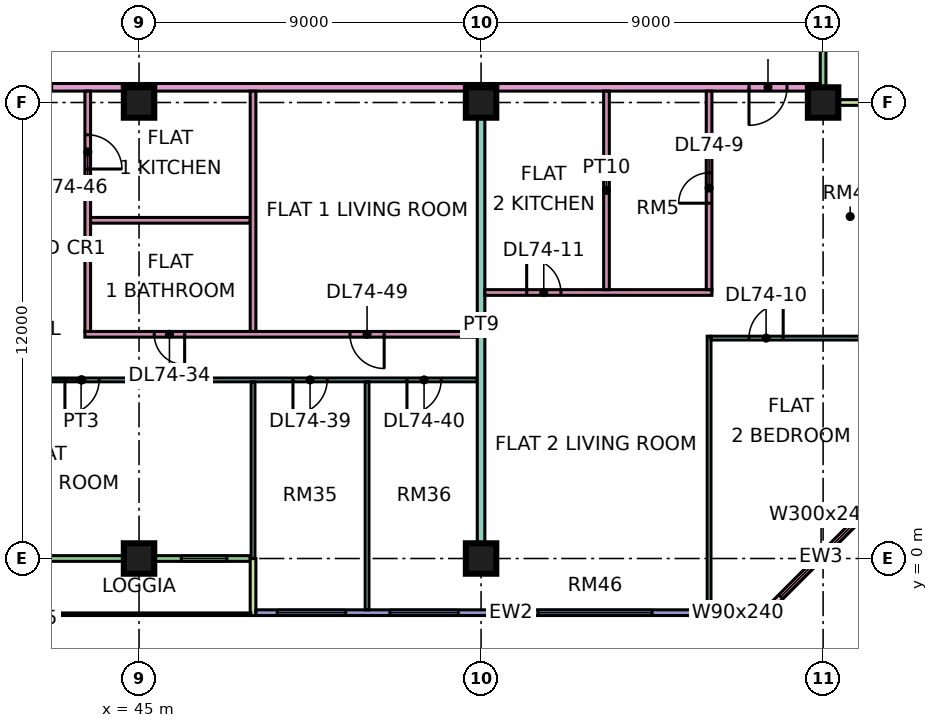
"""IFC4 building model, lengths in metres.
Left out: names, types, materials, properties, quantities, classifications, styles, units other than length and angle.
Written with IfcOpenShell. Run it as: python <this file> out.ifc"""

import sys

from ifc_helpers import new_model, si_unit, direction, frame, frame_2d, origin, origin_2d, place, context, subcontext, project, spatial, rectangle, extrude, element, fill, save


model = new_model("IFC4")
c1 = context("Model", 3, precision=1e-05, world=origin(), true_north=direction((0.0, 1.0)))
c2 = subcontext(c1, "Body", "Model", "MODEL_VIEW")
j1 = project(units=[si_unit("LENGTHUNIT", "METRE"), si_unit("PLANEANGLEUNIT", "RADIAN")], contexts=[c1])
p1 = place(None, origin())
s1 = spatial("IfcSite", under=j1, at=p1, CompositionType="ELEMENT")
p2 = place(p1, origin())
s2 = spatial("IfcBuilding", under=s1, at=p2, CompositionType="ELEMENT")
p3 = place(p2, frame((0.0, 0.0, 314.65)))
s3 = spatial("IfcBuildingStorey", under=s2, at=p3, CompositionType="ELEMENT", Elevation=314.65)
for number, where, z_axis, x_axis in (
    (1, (45.0, 0.0, 0.0), (0.0, 0.0, 1.0), (1.0, 0.0, 0.0)),
    (2, (45.0, 12.0, 0.0), (0.0, 0.0, 1.0), (1.0, 0.0, 0.0)),
    (3, (54.0, 0.0, 0.0), (0.0, 0.0, 1.0), (1.0, 0.0, 0.0)),
    (4, (54.0, 12.0, 0.0), (0.0, 0.0, 1.0), (1.0, 0.0, 0.0)),
    (5, (63.0, 12.0, 0.0), (0.0, 0.0, 1.0), (1.0, 0.0, 0.0)),
):
    element("IfcColumn", number, at=place(p3, frame(where, z_axis=z_axis, x_axis=x_axis)), inside=s3, PredefinedType="COLUMN", context=c2, shape_type="SweptSolid", body=[
        extrude(rectangle(XDim=0.8, YDim=0.8, at=origin_2d()), origin(), (0.0, 0.0, 1.0), 3.75),
    ])
p4 = place(p3, frame((36.075, 0.0, 0.0), z_axis=(0.0, 0.0, 1.0), x_axis=(1.0, 0.0, 0.0)))
e6 = element("IfcWall", 6, at=p4, inside=s3, PredefinedType="SOLIDWALL", context=c2, shape_type="SweptSolid", body=[
    extrude(rectangle(XDim=11.85, YDim=0.15, at=frame_2d((5.925, 0.0))), origin(), (0.0, 0.0, 1.0), 3.35),
])
p5 = place(p4, frame((0.775, 0.0, 0.45)))
e7 = element("IfcOpeningElement", 7, at=p5, cuts=e6, PredefinedType="OPENING", context=c2, shape_type="SweptSolid", body=[
    extrude(rectangle(XDim=1.8, YDim=2.4, at=frame_2d((0.9, 1.2))), frame((0.0, 0.085, 0.0), z_axis=(0.0, -1.0, 0.0), x_axis=(1.0, 0.0, 0.0)), (0.0, 0.0, 1.0), 0.17),
])
p6 = place(p4, frame((4.775, 0.0, 0.0)))
e8 = element("IfcOpeningElement", 8, at=p6, cuts=e6, PredefinedType="OPENING", context=c2, shape_type="SweptSolid", body=[
    extrude(rectangle(XDim=1.8, YDim=2.4, at=frame_2d((0.9, 1.2))), frame((0.0, 0.085, 0.0), z_axis=(0.0, -1.0, 0.0), x_axis=(1.0, 0.0, 0.0)), (0.0, 0.0, 1.0), 0.17),
])
p7 = place(p4, frame((10.038, 0.0, 0.45)))
e9 = element("IfcOpeningElement", 9, at=p7, cuts=e6, PredefinedType="OPENING", context=c2, shape_type="SweptSolid", body=[
    extrude(rectangle(XDim=1.2, YDim=2.4, at=frame_2d((0.6, 1.2))), frame((0.0, 0.085, 0.0), z_axis=(0.0, -1.0, 0.0), x_axis=(1.0, 0.0, 0.0)), (0.0, 0.0, 1.0), 0.17),
])
p8 = place(p3, frame((48.0, -1.5, 0.0), z_axis=(0.0, 0.0, 1.0), x_axis=(0.0, 1.0, 0.0)))
e10 = element("IfcWall", 10, at=p8, inside=s3, PredefinedType="SOLIDWALL", context=c2, shape_type="SweptSolid", body=[
    extrude(rectangle(XDim=1.5, YDim=0.15, at=frame_2d((0.75, 0.0))), origin(), (0.0, 0.0, 1.0), 3.35),
])
p9 = place(p3, frame((48.075, -1.425, 0.0), z_axis=(0.0, 0.0, 1.0), x_axis=(1.0, 0.0, 0.0)))
e11 = element("IfcWall", 11, at=p9, inside=s3, PredefinedType="SOLIDWALL", context=c2, shape_type="SweptSolid", body=[
    extrude(rectangle(XDim=13.425, YDim=0.15, at=frame_2d((6.712, 0.0))), origin(), (0.0, 0.0, 1.0), 3.35),
])
p10 = place(p9, frame((0.562, 0.0, 0.45)))
e12 = element("IfcOpeningElement", 12, at=p10, cuts=e11, PredefinedType="OPENING", context=c2, shape_type="SweptSolid", body=[
    extrude(rectangle(XDim=1.8, YDim=2.4, at=frame_2d((0.9, 1.2))), frame((0.0, 0.085, 0.0), z_axis=(0.0, -1.0, 0.0), x_axis=(1.0, 0.0, 0.0)), (0.0, 0.0, 1.0), 0.17),
])
p11 = place(p9, frame((3.525, 0.0, 0.45)))
e13 = element("IfcOpeningElement", 13, at=p11, cuts=e11, PredefinedType="OPENING", context=c2, shape_type="SweptSolid", body=[
    extrude(rectangle(XDim=1.8, YDim=2.4, at=frame_2d((0.9, 1.2))), frame((0.0, 0.085, 0.0), z_axis=(0.0, -1.0, 0.0), x_axis=(1.0, 0.0, 0.0)), (0.0, 0.0, 1.0), 0.17),
])
p12 = place(p9, frame((7.425, 0.0, 0.45)))
e14 = element("IfcOpeningElement", 14, at=p12, cuts=e11, PredefinedType="OPENING", context=c2, shape_type="SweptSolid", body=[
    extrude(rectangle(XDim=3.0, YDim=2.4, at=frame_2d((1.5, 1.2))), frame((0.0, 0.085, 0.0), z_axis=(0.0, -1.0, 0.0), x_axis=(1.0, 0.0, 0.0)), (0.0, 0.0, 1.0), 0.17),
])
p13 = place(p9, frame((12.225, 0.0, 0.45)))
e15 = element("IfcOpeningElement", 15, at=p13, cuts=e11, PredefinedType="OPENING", context=c2, shape_type="SweptSolid", body=[
    extrude(rectangle(XDim=0.9, YDim=2.4, at=frame_2d((0.45, 1.2))), frame((0.0, 0.085, 0.0), z_axis=(0.0, -1.0, 0.0), x_axis=(1.0, 0.0, 0.0)), (0.0, 0.0, 1.0), 0.17),
])
p14 = place(p3, frame((61.447, -1.447, 0.0), z_axis=(0.0, 0.0, 1.0), x_axis=(0.707106781187, 0.707106781187, 0.0)))
e16 = element("IfcWall", 16, at=p14, inside=s3, PredefinedType="SOLIDWALL", context=c2, shape_type="SweptSolid", body=[
    extrude(rectangle(XDim=4.243, YDim=0.15, at=frame_2d((2.121, 0.0))), origin(), (0.0, 0.0, 1.0), 3.35),
])
p15 = place(p14, frame((0.621, 0.0, 0.45)))
e17 = element("IfcOpeningElement", 17, at=p15, cuts=e16, PredefinedType="OPENING", context=c2, shape_type="SweptSolid", body=[
    extrude(rectangle(XDim=3.0, YDim=2.4, at=frame_2d((1.5, 1.2))), frame((0.0, 0.085, 0.0), z_axis=(0.0, -1.0, 0.0), x_axis=(1.0, 0.0, 0.0)), (0.0, 0.0, 1.0), 0.17),
])
p16 = place(p3, frame((63.0, 12.075, 0.0), z_axis=(0.0, 0.0, 1.0), x_axis=(0.0, 1.0, 0.0)))
e18 = element("IfcWall", 18, at=p16, inside=s3, PredefinedType="SOLIDWALL", context=c2, shape_type="SweptSolid", body=[
    extrude(rectangle(XDim=10.35, YDim=0.15, at=frame_2d((5.175, 0.0))), origin(), (0.0, 0.0, 1.0), 3.35),
])
p17 = place(p16, frame((6.038, 0.0, 0.0)))
e19 = element("IfcOpeningElement", 19, at=p17, cuts=e18, PredefinedType="OPENING", context=c2, shape_type="SweptSolid", body=[
    extrude(rectangle(XDim=1.8, YDim=2.4, at=frame_2d((0.9, 1.2))), frame((0.0, 0.085, 0.0), z_axis=(0.0, -1.0, 0.0), x_axis=(1.0, 0.0, 0.0)), (0.0, 0.0, 1.0), 0.17),
])
p18 = place(p3, frame((64.5, 12.0, 0.0), z_axis=(0.0, 0.0, 1.0), x_axis=(-1.0, 0.0, 0.0)))
e20 = element("IfcWall", 20, at=p18, inside=s3, PredefinedType="SOLIDWALL", context=c2, shape_type="SweptSolid", body=[
    extrude(rectangle(XDim=1.5, YDim=0.15, at=frame_2d((0.75, 0.0))), origin(), (0.0, 0.0, 1.0), 3.35),
])
p19 = place(p3, frame((33.05, 4.7, 0.0), z_axis=(0.0, 0.0, 1.0), x_axis=(1.0, 0.0, 0.0)))
e21 = element("IfcWall", 21, at=p19, inside=s3, PredefinedType="PARTITIONING", context=c2, shape_type="SweptSolid", body=[
    extrude(rectangle(XDim=20.85, YDim=0.1, at=frame_2d((10.425, 0.0))), origin(), (0.0, 0.0, 1.0), 3.35),
])
p20 = place(p19, frame((1.0, 0.0, 0.0)))
e22 = element("IfcOpeningElement", 22, at=p20, cuts=e21, PredefinedType="OPENING", context=c2, shape_type="SweptSolid", body=[
    extrude(rectangle(XDim=0.9, YDim=2.1, at=frame_2d((0.45, 1.05))), frame((0.0, 0.06, 0.0), z_axis=(0.0, -1.0, 0.0), x_axis=(1.0, 0.0, 0.0)), (0.0, 0.0, 1.0), 0.12),
])
p21 = place(p19, frame((4.0, 0.0, 0.0)))
e23 = element("IfcOpeningElement", 23, at=p21, cuts=e21, PredefinedType="OPENING", context=c2, shape_type="SweptSolid", body=[
    extrude(rectangle(XDim=0.9, YDim=2.1, at=frame_2d((0.45, 1.05))), frame((0.0, 0.06, 0.0), z_axis=(0.0, -1.0, 0.0), x_axis=(1.0, 0.0, 0.0)), (0.0, 0.0, 1.0), 0.12),
])
p22 = place(p19, frame((16.0, 0.0, 0.0)))
e24 = element("IfcOpeningElement", 24, at=p22, cuts=e21, PredefinedType="OPENING", context=c2, shape_type="SweptSolid", body=[
    extrude(rectangle(XDim=0.9, YDim=2.1, at=frame_2d((0.45, 1.05))), frame((0.0, 0.06, 0.0), z_axis=(0.0, -1.0, 0.0), x_axis=(1.0, 0.0, 0.0)), (0.0, 0.0, 1.0), 0.12),
])
p23 = place(p19, frame((19.0, 0.0, 0.0)))
e25 = element("IfcOpeningElement", 25, at=p23, cuts=e21, PredefinedType="OPENING", context=c2, shape_type="SweptSolid", body=[
    extrude(rectangle(XDim=0.9, YDim=2.1, at=frame_2d((0.45, 1.05))), frame((0.0, 0.06, 0.0), z_axis=(0.0, -1.0, 0.0), x_axis=(1.0, 0.0, 0.0)), (0.0, 0.0, 1.0), 0.12),
])
p24 = place(p19, frame((10.0, 0.0, 0.0)))
e26 = element("IfcOpeningElement", 26, at=p24, cuts=e21, PredefinedType="OPENING", context=c2, shape_type="SweptSolid", body=[
    extrude(rectangle(XDim=0.9, YDim=2.1, at=frame_2d((0.45, 1.05))), frame((0.0, 0.06, 0.0), z_axis=(0.0, -1.0, 0.0), x_axis=(1.0, 0.0, 0.0)), (0.0, 0.0, 1.0), 0.12),
])
p25 = place(p3, frame((40.65, 12.4, 0.0), z_axis=(0.0, 0.0, 1.0), x_axis=(1.0, 0.0, 0.0)))
e27 = element("IfcWall", 27, at=p25, inside=s3, PredefinedType="PARTITIONING", context=c2, shape_type="SweptSolid", body=[
    extrude(rectangle(XDim=22.276, YDim=0.2, at=frame_2d((11.138, 0.0))), origin(), (0.0, 0.0, 1.0), 3.35),
])
p26 = place(p25, frame((20.4, 0.0, 0.0)))
e28 = element("IfcOpeningElement", 28, at=p26, cuts=e27, PredefinedType="OPENING", context=c2, shape_type="SweptSolid", body=[
    extrude(rectangle(XDim=1.0, YDim=2.1, at=frame_2d((0.5, 1.05))), frame((0.0, 0.11, 0.0), z_axis=(0.0, -1.0, 0.0), x_axis=(1.0, 0.0, 0.0)), (0.0, 0.0, 1.0), 0.22),
])
p27 = place(p25, frame((1.05, 0.0, 0.0)))
e29 = element("IfcOpeningElement", 29, at=p27, cuts=e27, PredefinedType="OPENING", context=c2, shape_type="SweptSolid", body=[
    extrude(rectangle(XDim=1.0, YDim=2.1, at=frame_2d((0.5, 1.05))), frame((0.0, 0.11, 0.0), z_axis=(0.0, -1.0, 0.0), x_axis=(1.0, 0.0, 0.0)), (0.0, 0.0, 1.0), 0.22),
])
p28 = place(p3, frame((43.575, 5.9, 0.0), z_axis=(0.0, 0.0, 1.0), x_axis=(1.0, 0.0, 0.0)))
e30 = element("IfcWall", 30, at=p28, inside=s3, PredefinedType="PARTITIONING", context=c2, shape_type="SweptSolid", body=[
    extrude(rectangle(XDim=10.325, YDim=0.15, at=frame_2d((5.163, 0.0))), origin(), (0.0, 0.0, 1.0), 3.35),
])
p29 = place(p28, frame((1.825, 0.0, 0.0)))
e31 = element("IfcOpeningElement", 31, at=p29, cuts=e30, PredefinedType="OPENING", context=c2, shape_type="SweptSolid", body=[
    extrude(rectangle(XDim=0.8, YDim=2.1, at=frame_2d((0.4, 1.05))), frame((0.0, 0.085, 0.0), z_axis=(0.0, -1.0, 0.0), x_axis=(1.0, 0.0, 0.0)), (0.0, 0.0, 1.0), 0.17),
])
p30 = place(p28, frame((6.975, 0.0, 0.0)))
e32 = element("IfcOpeningElement", 32, at=p30, cuts=e30, PredefinedType="OPENING", context=c2, shape_type="SweptSolid", body=[
    extrude(rectangle(XDim=0.9, YDim=2.1, at=frame_2d((0.45, 1.05))), frame((0.0, 0.085, 0.0), z_axis=(0.0, -1.0, 0.0), x_axis=(1.0, 0.0, 0.0)), (0.0, 0.0, 1.0), 0.17),
])
p31 = place(p3, frame((43.65, 5.975, 0.0), z_axis=(0.0, 0.0, 1.0), x_axis=(0.0, 1.0, 0.0)))
e33 = element("IfcWall", 33, at=p31, inside=s3, PredefinedType="PARTITIONING", context=c2, shape_type="SweptSolid", body=[
    extrude(rectangle(XDim=6.325, YDim=0.15, at=frame_2d((3.163, 0.0))), origin(), (0.0, 0.0, 1.0), 3.35),
])
p32 = place(p31, frame((4.275, 0.0, 0.0)))
e34 = element("IfcOpeningElement", 34, at=p32, cuts=e33, PredefinedType="OPENING", context=c2, shape_type="SweptSolid", body=[
    extrude(rectangle(XDim=0.9, YDim=2.1, at=frame_2d((0.45, 1.05))), frame((0.0, 0.085, 0.0), z_axis=(0.0, -1.0, 0.0), x_axis=(1.0, 0.0, 0.0)), (0.0, 0.0, 1.0), 0.17),
])
p33 = place(p3, frame((43.725, 8.9, 0.0), z_axis=(0.0, 0.0, 1.0), x_axis=(1.0, 0.0, 0.0)))
e35 = element("IfcWall", 35, at=p33, inside=s3, PredefinedType="PARTITIONING", context=c2, shape_type="SweptSolid", body=[
    extrude(rectangle(XDim=4.2, YDim=0.15, at=frame_2d((2.1, 0.0))), origin(), (0.0, 0.0, 1.0), 3.35),
])
p34 = place(p3, frame((48.0, 0.0, 0.0), z_axis=(0.0, 0.0, 1.0), x_axis=(0.0, 1.0, 0.0)))
e36 = element("IfcWall", 36, at=p34, inside=s3, PredefinedType="PARTITIONING", context=c2, shape_type="SweptSolid", body=[
    extrude(rectangle(XDim=4.65, YDim=0.1, at=frame_2d((2.325, 0.0))), origin(), (0.0, 0.0, 1.0), 3.35),
])
p35 = place(p3, frame((48.0, 5.975, 0.0), z_axis=(0.0, 0.0, 1.0), x_axis=(0.0, 1.0, 0.0)))
e37 = element("IfcWall", 37, at=p35, inside=s3, PredefinedType="PARTITIONING", context=c2, shape_type="SweptSolid", body=[
    extrude(rectangle(XDim=6.325, YDim=0.15, at=frame_2d((3.163, 0.0))), origin(), (0.0, 0.0, 1.0), 3.35),
])
p36 = place(p3, frame((51.0, -1.351, 0.0), z_axis=(0.0, 0.0, 1.0), x_axis=(0.0, 1.0, 0.0)))
e38 = element("IfcWall", 38, at=p36, inside=s3, PredefinedType="PARTITIONING", context=c2, shape_type="SweptSolid", body=[
    extrude(rectangle(XDim=6.001, YDim=0.1, at=frame_2d((3.0, 0.0))), origin(), (0.0, 0.0, 1.0), 3.35),
])
p37 = place(p3, frame((54.0, 0.0, 0.0), z_axis=(0.0, 0.0, 1.0), x_axis=(0.0, 1.0, 0.0)))
e39 = element("IfcWall", 39, at=p37, inside=s3, PredefinedType="PARTITIONING", context=c2, shape_type="SweptSolid", body=[
    extrude(rectangle(XDim=12.3, YDim=0.2, at=frame_2d((6.15, 0.0))), origin(), (0.0, 0.0, 1.0), 3.35),
])
p38 = place(p3, frame((54.1, 7.0, 0.0), z_axis=(0.0, 0.0, 1.0), x_axis=(1.0, 0.0, 0.0)))
e40 = element("IfcWall", 40, at=p38, inside=s3, PredefinedType="PARTITIONING", context=c2, shape_type="SweptSolid", body=[
    extrude(rectangle(XDim=5.975, YDim=0.15, at=frame_2d((2.987, 0.0))), origin(), (0.0, 0.0, 1.0), 3.35),
])
p39 = place(p38, frame((1.1, 0.0, 0.0)))
e41 = element("IfcOpeningElement", 41, at=p39, cuts=e40, PredefinedType="OPENING", context=c2, shape_type="SweptSolid", body=[
    extrude(rectangle(XDim=0.9, YDim=2.1, at=frame_2d((0.45, 1.05))), frame((0.0, 0.085, 0.0), z_axis=(0.0, -1.0, 0.0), x_axis=(1.0, 0.0, 0.0)), (0.0, 0.0, 1.0), 0.17),
])
p40 = place(p3, frame((57.3, 7.075, 0.0), z_axis=(0.0, 0.0, 1.0), x_axis=(0.0, 1.0, 0.0)))
e42 = element("IfcWall", 42, at=p40, inside=s3, PredefinedType="PARTITIONING", context=c2, shape_type="SweptSolid", body=[
    extrude(rectangle(XDim=5.225, YDim=0.15, at=frame_2d((2.613, 0.0))), origin(), (0.0, 0.0, 1.0), 3.35),
])
p41 = place(p3, frame((60.0, -1.35, 0.0), z_axis=(0.0, 0.0, 1.0), x_axis=(0.0, 1.0, 0.0)))
e43 = element("IfcWall", 43, at=p41, inside=s3, PredefinedType="PARTITIONING", context=c2, shape_type="SweptSolid", body=[
    extrude(rectangle(XDim=7.2, YDim=0.1, at=frame_2d((3.6, 0.0))), origin(), (0.0, 0.0, 1.0), 3.35),
])
p42 = place(p3, frame((60.0, 7.075, 0.0), z_axis=(0.0, 0.0, 1.0), x_axis=(0.0, 1.0, 0.0)))
e44 = element("IfcWall", 44, at=p42, inside=s3, PredefinedType="PARTITIONING", context=c2, shape_type="SweptSolid", body=[
    extrude(rectangle(XDim=5.225, YDim=0.15, at=frame_2d((2.613, 0.0))), origin(), (0.0, 0.0, 1.0), 3.35),
])
p43 = place(p42, frame((2.275, 0.0, 0.0)))
e45 = element("IfcOpeningElement", 45, at=p43, cuts=e44, PredefinedType="OPENING", context=c2, shape_type="SweptSolid", body=[
    extrude(rectangle(XDim=0.8, YDim=2.1, at=frame_2d((0.4, 1.05))), frame((0.0, 0.085, 0.0), z_axis=(0.0, -1.0, 0.0), x_axis=(1.0, 0.0, 0.0)), (0.0, 0.0, 1.0), 0.17),
])
p44 = place(p3, frame((60.05, 5.8, 0.0), z_axis=(0.0, 0.0, 1.0), x_axis=(1.0, 0.0, 0.0)))
e46 = element("IfcWall", 46, at=p44, inside=s3, PredefinedType="PARTITIONING", context=c2, shape_type="SweptSolid", body=[
    extrude(rectangle(XDim=4.3, YDim=0.1, at=frame_2d((2.15, 0.0))), origin(), (0.0, 0.0, 1.0), 3.35),
])
p45 = place(p44, frame((1.0, 0.0, 0.0)))
e47 = element("IfcOpeningElement", 47, at=p45, cuts=e46, PredefinedType="OPENING", context=c2, shape_type="SweptSolid", body=[
    extrude(rectangle(XDim=0.9, YDim=2.1, at=frame_2d((0.45, 1.05))), frame((0.0, 0.06, 0.0), z_axis=(0.0, -1.0, 0.0), x_axis=(1.0, 0.0, 0.0)), (0.0, 0.0, 1.0), 0.12),
])
p46 = place(p7, origin())
e48 = element("IfcWindow", 48, at=p46, inside=s3, PartitioningType="SINGLE_PANEL", PredefinedType="WINDOW", context=c2, shape_type="SweptSolid", body=[
    extrude(rectangle(XDim=1.2, YDim=2.4, at=frame_2d((0.6, 1.2))), frame((0.0, 0.03, 0.0), z_axis=(0.0, -1.0, 0.0), x_axis=(1.0, 0.0, 0.0)), (0.0, 0.0, 1.0), 0.06),
])
fill(e9, e48)
p47 = place(p10, origin())
e49 = element("IfcWindow", 49, at=p47, inside=s3, PartitioningType="SINGLE_PANEL", PredefinedType="WINDOW", context=c2, shape_type="SweptSolid", body=[
    extrude(rectangle(XDim=1.8, YDim=2.4, at=frame_2d((0.9, 1.2))), frame((0.0, 0.03, 0.0), z_axis=(0.0, -1.0, 0.0), x_axis=(1.0, 0.0, 0.0)), (0.0, 0.0, 1.0), 0.06),
])
fill(e12, e49)
p48 = place(p11, origin())
e50 = element("IfcWindow", 50, at=p48, inside=s3, PartitioningType="SINGLE_PANEL", PredefinedType="WINDOW", context=c2, shape_type="SweptSolid", body=[
    extrude(rectangle(XDim=1.8, YDim=2.4, at=frame_2d((0.9, 1.2))), frame((0.0, 0.03, 0.0), z_axis=(0.0, -1.0, 0.0), x_axis=(1.0, 0.0, 0.0)), (0.0, 0.0, 1.0), 0.06),
])
fill(e13, e50)
p49 = place(p12, origin())
e51 = element("IfcWindow", 51, at=p49, inside=s3, PartitioningType="SINGLE_PANEL", PredefinedType="WINDOW", context=c2, shape_type="SweptSolid", body=[
    extrude(rectangle(XDim=3.0, YDim=2.4, at=frame_2d((1.5, 1.2))), frame((0.0, 0.03, 0.0), z_axis=(0.0, -1.0, 0.0), x_axis=(1.0, 0.0, 0.0)), (0.0, 0.0, 1.0), 0.06),
])
fill(e14, e51)
p50 = place(p13, origin())
e52 = element("IfcWindow", 52, at=p50, inside=s3, PartitioningType="SINGLE_PANEL", PredefinedType="WINDOW", context=c2, shape_type="SweptSolid", body=[
    extrude(rectangle(XDim=0.9, YDim=2.4, at=frame_2d((0.45, 1.2))), frame((0.0, 0.03, 0.0), z_axis=(0.0, -1.0, 0.0), x_axis=(1.0, 0.0, 0.0)), (0.0, 0.0, 1.0), 0.06),
])
fill(e15, e52)
p51 = place(p15, origin())
e53 = element("IfcWindow", 53, at=p51, inside=s3, PartitioningType="SINGLE_PANEL", PredefinedType="WINDOW", context=c2, shape_type="SweptSolid", body=[
    extrude(rectangle(XDim=3.0, YDim=2.4, at=frame_2d((1.5, 1.2))), frame((0.0, 0.03, 0.0), z_axis=(0.0, -1.0, 0.0), x_axis=(1.0, 0.0, 0.0)), (0.0, 0.0, 1.0), 0.06),
])
fill(e17, e53)
p52 = place(p43, origin())
e54 = element("IfcDoor", 54, at=p52, inside=s3, OperationType="SINGLE_SWING_LEFT", PredefinedType="DOOR", context=c2, shape_type="SweptSolid", body=[
    extrude(rectangle(XDim=0.8, YDim=2.1, at=frame_2d((0.4, 1.05))), frame((0.0, 0.025, 0.0), z_axis=(0.0, -1.0, 0.0), x_axis=(1.0, 0.0, 0.0)), (0.0, 0.0, 1.0), 0.05),
])
fill(e45, e54)
p53 = place(p45, frame((0.9, 0.0, 0.0), z_axis=(0.0, 0.0, 1.0), x_axis=(-1.0, 0.0, 0.0)))
e55 = element("IfcDoor", 55, at=p53, inside=s3, OperationType="SINGLE_SWING_RIGHT", PredefinedType="DOOR", context=c2, shape_type="SweptSolid", body=[
    extrude(rectangle(XDim=0.9, YDim=2.1, at=frame_2d((0.45, 1.05))), frame((0.0, 0.025, 0.0), z_axis=(0.0, -1.0, 0.0), x_axis=(1.0, 0.0, 0.0)), (0.0, 0.0, 1.0), 0.05),
])
fill(e47, e55)
p54 = place(p39, origin())
e56 = element("IfcDoor", 56, at=p54, inside=s3, OperationType="SINGLE_SWING_LEFT", PredefinedType="DOOR", context=c2, shape_type="SweptSolid", body=[
    extrude(rectangle(XDim=0.9, YDim=2.1, at=frame_2d((0.45, 1.05))), frame((0.0, 0.025, 0.0), z_axis=(0.0, -1.0, 0.0), x_axis=(1.0, 0.0, 0.0)), (0.0, 0.0, 1.0), 0.05),
])
fill(e41, e56)
p55 = place(p26, frame((1.0, 0.0, 0.0), z_axis=(0.0, 0.0, 1.0), x_axis=(-1.0, 0.0, 0.0)))
e57 = element("IfcDoor", 57, at=p55, inside=s3, OperationType="SINGLE_SWING_LEFT", PredefinedType="DOOR", context=c2, shape_type="SweptSolid", body=[
    extrude(rectangle(XDim=1.0, YDim=2.1, at=frame_2d((0.5, 1.05))), frame((0.0, 0.025, 0.0), z_axis=(0.0, -1.0, 0.0), x_axis=(1.0, 0.0, 0.0)), (0.0, 0.0, 1.0), 0.05),
])
fill(e28, e57)
p56 = place(p29, origin())
e58 = element("IfcDoor", 58, at=p56, inside=s3, OperationType="SINGLE_SWING_RIGHT", PredefinedType="DOOR", context=c2, shape_type="SweptSolid", body=[
    extrude(rectangle(XDim=0.8, YDim=2.1, at=frame_2d((0.4, 1.05))), frame((0.0, 0.025, 0.0), z_axis=(0.0, -1.0, 0.0), x_axis=(1.0, 0.0, 0.0)), (0.0, 0.0, 1.0), 0.05),
])
fill(e31, e58)
p57 = place(p22, frame((0.9, 0.0, 0.0), z_axis=(0.0, 0.0, 1.0), x_axis=(-1.0, 0.0, 0.0)))
e59 = element("IfcDoor", 59, at=p57, inside=s3, OperationType="SINGLE_SWING_LEFT", PredefinedType="DOOR", context=c2, shape_type="SweptSolid", body=[
    extrude(rectangle(XDim=0.9, YDim=2.1, at=frame_2d((0.45, 1.05))), frame((0.0, 0.025, 0.0), z_axis=(0.0, -1.0, 0.0), x_axis=(1.0, 0.0, 0.0)), (0.0, 0.0, 1.0), 0.05),
])
fill(e24, e59)
p58 = place(p23, frame((0.9, 0.0, 0.0), z_axis=(0.0, 0.0, 1.0), x_axis=(-1.0, 0.0, 0.0)))
e60 = element("IfcDoor", 60, at=p58, inside=s3, OperationType="SINGLE_SWING_LEFT", PredefinedType="DOOR", context=c2, shape_type="SweptSolid", body=[
    extrude(rectangle(XDim=0.9, YDim=2.1, at=frame_2d((0.45, 1.05))), frame((0.0, 0.025, 0.0), z_axis=(0.0, -1.0, 0.0), x_axis=(1.0, 0.0, 0.0)), (0.0, 0.0, 1.0), 0.05),
])
fill(e25, e60)
p59 = place(p32, frame((0.9, 0.0, 0.0), z_axis=(0.0, 0.0, 1.0), x_axis=(-1.0, 0.0, 0.0)))
e61 = element("IfcDoor", 61, at=p59, inside=s3, OperationType="SINGLE_SWING_LEFT", PredefinedType="DOOR", context=c2, shape_type="SweptSolid", body=[
    extrude(rectangle(XDim=0.9, YDim=2.1, at=frame_2d((0.45, 1.05))), frame((0.0, 0.025, 0.0), z_axis=(0.0, -1.0, 0.0), x_axis=(1.0, 0.0, 0.0)), (0.0, 0.0, 1.0), 0.05),
])
fill(e34, e61)
p60 = place(p24, frame((0.9, 0.0, 0.0), z_axis=(0.0, 0.0, 1.0), x_axis=(-1.0, 0.0, 0.0)))
e62 = element("IfcDoor", 62, at=p60, inside=s3, OperationType="SINGLE_SWING_LEFT", PredefinedType="DOOR", context=c2, shape_type="SweptSolid", body=[
    extrude(rectangle(XDim=0.9, YDim=2.1, at=frame_2d((0.45, 1.05))), frame((0.0, 0.025, 0.0), z_axis=(0.0, -1.0, 0.0), x_axis=(1.0, 0.0, 0.0)), (0.0, 0.0, 1.0), 0.05),
])
fill(e26, e62)
p61 = place(p30, origin())
e63 = element("IfcDoor", 63, at=p61, inside=s3, OperationType="SINGLE_SWING_RIGHT", PredefinedType="DOOR", context=c2, shape_type="SweptSolid", body=[
    extrude(rectangle(XDim=0.9, YDim=2.1, at=frame_2d((0.45, 1.05))), frame((0.0, 0.025, 0.0), z_axis=(0.0, -1.0, 0.0), x_axis=(1.0, 0.0, 0.0)), (0.0, 0.0, 1.0), 0.05),
])
fill(e32, e63)
save(model, sys.argv[1])
